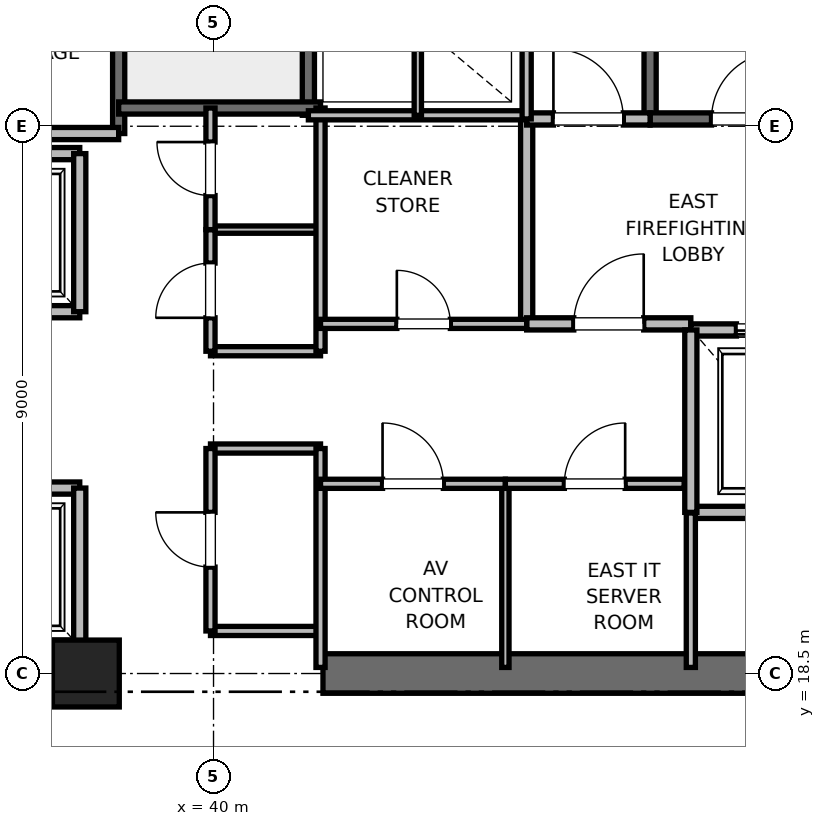
"""IFC4 building model, lengths in metres.
Left out: names, types, materials, properties, quantities, classifications, styles, units other than length and angle.
Written with IfcOpenShell. Run it as: python <this file> out.ifc"""

import sys

from ifc_helpers import new_model, si_unit, direction, frame, frame_2d, origin, origin_2d, place, context, subcontext, project, spatial, rectangle, extrude, element, fill, save


model = new_model("IFC4")
c1 = context("Model", 3, precision=1e-05, world=origin(), true_north=direction((0.0, 1.0)))
c2 = subcontext(c1, "Body", "Model", "MODEL_VIEW")
j1 = project(units=[si_unit("LENGTHUNIT", "METRE"), si_unit("PLANEANGLEUNIT", "RADIAN")], contexts=[c1])
p1 = place(None, origin())
s1 = spatial("IfcSite", under=j1, at=p1, CompositionType="ELEMENT")
p2 = place(p1, origin())
s2 = spatial("IfcBuilding", under=s1, at=p2, CompositionType="ELEMENT")
p3 = place(p2, frame((0.0, 0.0, 95.6)))
s3 = spatial("IfcBuildingStorey", under=s2, at=p3, CompositionType="ELEMENT", Elevation=95.6)
p4 = place(p3, frame((37.9, 18.5, 0.0), z_axis=(0.0, 0.0, 1.0), x_axis=(1.0, 0.0, 0.0)))
e1 = element("IfcColumn", 1, at=p4, inside=s3, PredefinedType="PILASTER", context=c2, shape_type="SweptSolid", body=[
    extrude(rectangle(XDim=1.1, YDim=1.1, at=origin_2d()), origin(), (0.0, 0.0, 1.0), 4.0),
])
for number, where, z_axis, x_axis in (
    (2, (29.0, 18.5, 0.0), (0.0, 0.0, 1.0), (1.0, 0.0, 0.0)),
    (3, (41.8, 18.5, 0.0), (0.0, 0.0, 1.0), (1.0, 0.0, 0.0)),
):
    element("IfcWall", number, at=place(p3, frame(where, z_axis=z_axis, x_axis=x_axis)), inside=s3, PredefinedType="SHEAR", context=c2, shape_type="SweptSolid", body=[
        extrude(rectangle(XDim=9.2, YDim=0.65, at=frame_2d((4.6, 0.0))), origin(), (0.0, 0.0, 1.0), 3.76),
    ])
p5 = place(p3, frame((47.18, 27.62, 0.0), z_axis=(0.0, 0.0, 1.0), x_axis=(0.0, 1.0, 0.0)))
e4 = element("IfcWall", 4, at=p5, inside=s3, PredefinedType="SOLIDWALL", context=c2, shape_type="SweptSolid", body=[
    extrude(rectangle(XDim=8.18, YDim=0.2, at=frame_2d((4.09, 0.0))), origin(), (0.0, 0.0, 1.0), 3.76),
])
p6 = place(p3, frame((47.18, 27.62, 0.0), z_axis=(0.0, 0.0, 1.0), x_axis=(1.0, 0.0, 0.0)))
e5 = element("IfcWall", 5, at=p6, inside=s3, PredefinedType="SOLIDWALL", context=c2, shape_type="SweptSolid", body=[
    extrude(rectangle(XDim=3.12, YDim=0.2, at=frame_2d((1.56, 0.0))), origin(), (0.0, 0.0, 1.0), 3.76),
])
p7 = place(p6, frame((1.01, 0.0, 0.0)))
e6 = element("IfcOpeningElement", 6, at=p7, cuts=e5, PredefinedType="OPENING", context=c2, shape_type="SweptSolid", body=[
    extrude(rectangle(XDim=1.1, YDim=2.15, at=frame_2d((0.55, 1.075))), frame((0.0, 0.1, 0.0), z_axis=(0.0, -1.0, 0.0), x_axis=(1.0, 0.0, 0.0)), (0.0, 0.0, 1.0), 0.2),
])
p8 = place(p3, frame((38.44, 27.38, 0.0), z_axis=(0.0, 0.0, 1.0), x_axis=(0.0, 1.0, 0.0)))
e7 = element("IfcWall", 7, at=p8, inside=s3, PredefinedType="SOLIDWALL", context=c2, shape_type="SweptSolid", body=[
    extrude(rectangle(XDim=8.87, YDim=0.2, at=frame_2d((4.435, 0.0))), origin(), (0.0, 0.0, 1.0), 3.76),
])
p9 = place(p3, frame((41.56, 27.68, 0.0), z_axis=(0.0, 0.0, 1.0), x_axis=(0.0, 1.0, 0.0)))
e8 = element("IfcWall", 8, at=p9, inside=s3, PredefinedType="SOLIDWALL", context=c2, shape_type="SweptSolid", body=[
    extrude(rectangle(XDim=8.57, YDim=0.2, at=frame_2d((4.285, 0.0))), origin(), (0.0, 0.0, 1.0), 3.76),
])
p10 = place(p3, frame((38.44, 27.8, 0.0), z_axis=(0.0, 0.0, 1.0), x_axis=(1.0, 0.0, 0.0)))
e9 = element("IfcWall", 9, at=p10, inside=s3, PredefinedType="SOLIDWALL", context=c2, shape_type="SweptSolid", body=[
    extrude(rectangle(XDim=3.32, YDim=0.2, at=frame_2d((1.66, 0.0))), origin(), (0.0, 0.0, 1.0), 3.76),
])
p11 = place(p3, frame((32.82, 27.38, 0.0), z_axis=(0.0, 0.0, 1.0), x_axis=(1.0, 0.0, 0.0)))
e10 = element("IfcWall", 10, at=p11, inside=s3, PredefinedType="PARTITIONING", context=c2, shape_type="SweptSolid", body=[
    extrude(rectangle(XDim=5.62, YDim=0.2, at=frame_2d((2.81, 0.0))), origin(), (0.0, 0.0, 1.0), 3.76),
])
p12 = place(p3, frame((45.15, 24.25, 0.0), z_axis=(0.0, 0.0, 1.0), x_axis=(0.0, 1.0, 0.0)))
e11 = element("IfcWall", 11, at=p12, inside=s3, PredefinedType="PARTITIONING", context=c2, shape_type="SweptSolid", body=[
    extrude(rectangle(XDim=3.37, YDim=0.2, at=frame_2d((1.685, 0.0))), origin(), (0.0, 0.0, 1.0), 3.76),
])
p13 = place(p3, frame((45.15, 24.25, 0.0), z_axis=(0.0, 0.0, 1.0), x_axis=(1.0, 0.0, 0.0)))
e12 = element("IfcWall", 12, at=p13, inside=s3, PredefinedType="PARTITIONING", context=c2, shape_type="SweptSolid", body=[
    extrude(rectangle(XDim=2.7, YDim=0.2, at=frame_2d((1.35, 0.0))), origin(), (0.0, 0.0, 1.0), 3.76),
])
p14 = place(p13, frame((0.775, 0.0, 0.0)))
e13 = element("IfcOpeningElement", 13, at=p14, cuts=e12, PredefinedType="OPENING", context=c2, shape_type="SweptSolid", body=[
    extrude(rectangle(XDim=1.15, YDim=2.2, at=frame_2d((0.575, 1.1))), frame((0.0, 0.1, 0.0), z_axis=(0.0, -1.0, 0.0), x_axis=(1.0, 0.0, 0.0)), (0.0, 0.0, 1.0), 0.2),
])
p15 = place(p3, frame((45.15, 27.62, 0.0), z_axis=(0.0, 0.0, 1.0), x_axis=(1.0, 0.0, 0.0)))
e14 = element("IfcWall", 14, at=p15, inside=s3, PredefinedType="PARTITIONING", context=c2, shape_type="SweptSolid", body=[
    extrude(rectangle(XDim=2.03, YDim=0.2, at=frame_2d((1.015, 0.0))), origin(), (0.0, 0.0, 1.0), 3.76),
])
p16 = place(p15, frame((0.44, 0.0, 0.0)))
e15 = element("IfcOpeningElement", 15, at=p16, cuts=e14, PredefinedType="OPENING", context=c2, shape_type="SweptSolid", body=[
    extrude(rectangle(XDim=1.15, YDim=2.2, at=frame_2d((0.575, 1.1))), frame((0.0, 0.1, 0.0), z_axis=(0.0, -1.0, 0.0), x_axis=(1.0, 0.0, 0.0)), (0.0, 0.0, 1.0), 0.2),
])
p17 = place(p3, frame((47.85, 21.15, 0.0), z_axis=(0.0, 0.0, 1.0), x_axis=(1.0, 0.0, 0.0)))
e16 = element("IfcWall", 16, at=p17, inside=s3, PredefinedType="SOLIDWALL", context=c2, shape_type="SweptSolid", body=[
    extrude(rectangle(XDim=2.6, YDim=0.2, at=frame_2d((1.3, 0.0))), origin(), (0.0, 0.0, 1.0), 3.76),
])
p18 = place(p3, frame((50.45, 24.15, 0.0), z_axis=(0.0, 0.0, 1.0), x_axis=(-1.0, 0.0, 0.0)))
e17 = element("IfcWall", 17, at=p18, inside=s3, PredefinedType="SOLIDWALL", context=c2, shape_type="SweptSolid", body=[
    extrude(rectangle(XDim=2.6, YDim=0.2, at=frame_2d((1.3, 0.0))), origin(), (0.0, 0.0, 1.0), 2.54),
])
p19 = place(p18, frame((0.75, 0.0, 0.0)))
e18 = element("IfcOpeningElement", 18, at=p19, cuts=e17, PredefinedType="OPENING", context=c2, shape_type="SweptSolid", body=[
    extrude(rectangle(XDim=1.1, YDim=2.2, at=frame_2d((0.55, 1.1))), frame((0.0, 0.1, 0.0), z_axis=(0.0, -1.0, 0.0), x_axis=(1.0, 0.0, 0.0)), (0.0, 0.0, 1.0), 0.2),
])
p20 = place(p3, frame((47.85, 24.15, 0.0), z_axis=(0.0, 0.0, 1.0), x_axis=(0.0, -1.0, 0.0)))
e19 = element("IfcWall", 19, at=p20, inside=s3, PredefinedType="SOLIDWALL", context=c2, shape_type="SweptSolid", body=[
    extrude(rectangle(XDim=3.0, YDim=0.2, at=frame_2d((1.5, 0.0))), origin(), (0.0, 0.0, 1.0), 3.76),
])
p21 = place(p3, frame((35.5, 18.95, 0.0), z_axis=(0.0, 0.0, 1.0), x_axis=(1.0, 0.0, 0.0)))
e20 = element("IfcWall", 20, at=p21, inside=s3, PredefinedType="SOLIDWALL", context=c2, shape_type="SweptSolid", body=[
    extrude(rectangle(XDim=2.3, YDim=0.2, at=frame_2d((1.15, 0.0))), origin(), (0.0, 0.0, 1.0), 2.54),
])
p22 = place(p3, frame((37.8, 21.55, 0.0), z_axis=(0.0, 0.0, 1.0), x_axis=(-1.0, 0.0, 0.0)))
e21 = element("IfcWall", 21, at=p22, inside=s3, PredefinedType="SOLIDWALL", context=c2, shape_type="SweptSolid", body=[
    extrude(rectangle(XDim=2.3, YDim=0.2, at=frame_2d((1.15, 0.0))), origin(), (0.0, 0.0, 1.0), 3.76),
])
p23 = place(p22, frame((0.6, 0.0, 0.0)))
e22 = element("IfcOpeningElement", 22, at=p23, cuts=e21, PredefinedType="OPENING", context=c2, shape_type="SweptSolid", body=[
    extrude(rectangle(XDim=1.1, YDim=2.2, at=frame_2d((0.55, 1.1))), frame((0.0, 0.1, 0.0), z_axis=(0.0, -1.0, 0.0), x_axis=(1.0, 0.0, 0.0)), (0.0, 0.0, 1.0), 0.2),
])
p24 = place(p3, frame((37.8, 18.95, 0.0), z_axis=(0.0, 0.0, 1.0), x_axis=(0.0, 1.0, 0.0)))
e23 = element("IfcWall", 23, at=p24, inside=s3, PredefinedType="SOLIDWALL", context=c2, shape_type="SweptSolid", body=[
    extrude(rectangle(XDim=2.6, YDim=0.2, at=frame_2d((1.3, 0.0))), origin(), (0.0, 0.0, 1.0), 2.54),
])
p25 = place(p3, frame((35.5, 24.45, 0.0), z_axis=(0.0, 0.0, 1.0), x_axis=(1.0, 0.0, 0.0)))
e24 = element("IfcWall", 24, at=p25, inside=s3, PredefinedType="SOLIDWALL", context=c2, shape_type="SweptSolid", body=[
    extrude(rectangle(XDim=2.3, YDim=0.2, at=frame_2d((1.15, 0.0))), origin(), (0.0, 0.0, 1.0), 3.76),
])
p26 = place(p25, frame((0.6, 0.0, 0.0)))
e25 = element("IfcOpeningElement", 25, at=p26, cuts=e24, PredefinedType="OPENING", context=c2, shape_type="SweptSolid", body=[
    extrude(rectangle(XDim=1.1, YDim=2.2, at=frame_2d((0.55, 1.1))), frame((0.0, 0.1, 0.0), z_axis=(0.0, -1.0, 0.0), x_axis=(1.0, 0.0, 0.0)), (0.0, 0.0, 1.0), 0.2),
])
p27 = place(p3, frame((37.8, 27.05, 0.0), z_axis=(0.0, 0.0, 1.0), x_axis=(-1.0, 0.0, 0.0)))
e26 = element("IfcWall", 26, at=p27, inside=s3, PredefinedType="SOLIDWALL", context=c2, shape_type="SweptSolid", body=[
    extrude(rectangle(XDim=2.3, YDim=0.2, at=frame_2d((1.15, 0.0))), origin(), (0.0, 0.0, 1.0), 3.76),
])
p28 = place(p3, frame((37.8, 24.45, 0.0), z_axis=(0.0, 0.0, 1.0), x_axis=(0.0, 1.0, 0.0)))
e27 = element("IfcWall", 27, at=p28, inside=s3, PredefinedType="SOLIDWALL", context=c2, shape_type="SweptSolid", body=[
    extrude(rectangle(XDim=2.6, YDim=0.2, at=frame_2d((1.3, 0.0))), origin(), (0.0, 0.0, 1.0), 3.76),
])
for number, where, z_axis, x_axis in (
    (28, (39.95, 19.2, 0.0), (0.0, 0.0, 1.0), (1.0, 0.0, 0.0)),
    (29, (39.95, 22.2, 0.0), (0.0, 0.0, 1.0), (1.0, 0.0, 0.0)),
    (30, (39.95, 23.8, 0.0), (0.0, 0.0, 1.0), (1.0, 0.0, 0.0)),
):
    element("IfcWall", number, at=place(p3, frame(where, z_axis=z_axis, x_axis=x_axis)), inside=s3, PredefinedType="PARTITIONING", context=c2, shape_type="SweptSolid", body=[
        extrude(rectangle(XDim=1.81, YDim=0.15, at=frame_2d((0.905, 0.0))), origin(), (0.0, 0.0, 1.0), 2.85),
    ])
p29 = place(p3, frame((39.95, 25.8, 0.0), z_axis=(0.0, 0.0, 1.0), x_axis=(1.0, 0.0, 0.0)))
e31 = element("IfcWall", 31, at=p29, inside=s3, PredefinedType="PARTITIONING", context=c2, shape_type="SweptSolid", body=[
    extrude(rectangle(XDim=1.81, YDim=0.12, at=frame_2d((0.905, 0.0))), origin(), (0.0, 0.0, 1.0), 2.85),
])
p30 = place(p3, frame((41.76, 18.6, 0.0), z_axis=(0.0, 0.0, 1.0), x_axis=(0.0, 1.0, 0.0)))
e32 = element("IfcWall", 32, at=p30, inside=s3, PredefinedType="PARTITIONING", context=c2, shape_type="SweptSolid", body=[
    extrude(rectangle(XDim=3.6, YDim=0.15, at=frame_2d((1.8, 0.0))), origin(), (0.0, 0.0, 1.0), 2.54),
])
p31 = place(p3, frame((41.76, 23.8, 0.0), z_axis=(0.0, 0.0, 1.0), x_axis=(0.0, 1.0, 0.0)))
e33 = element("IfcWall", 33, at=p31, inside=s3, PredefinedType="PARTITIONING", context=c2, shape_type="SweptSolid", body=[
    extrude(rectangle(XDim=4.0, YDim=0.15, at=frame_2d((2.0, 0.0))), origin(), (0.0, 0.0, 1.0), 2.85),
])
p32 = place(p3, frame((39.95, 19.2, 0.0), z_axis=(0.0, 0.0, 1.0), x_axis=(0.0, 1.0, 0.0)))
e34 = element("IfcWall", 34, at=p32, inside=s3, PredefinedType="PARTITIONING", context=c2, shape_type="SweptSolid", body=[
    extrude(rectangle(XDim=3.0, YDim=0.15, at=frame_2d((1.5, 0.0))), origin(), (0.0, 0.0, 1.0), 2.85),
])
p33 = place(p32, frame((1.05, 0.0, 0.0)))
e35 = element("IfcOpeningElement", 35, at=p33, cuts=e34, PredefinedType="OPENING", context=c2, shape_type="SweptSolid", body=[
    extrude(rectangle(XDim=0.9, YDim=2.1, at=frame_2d((0.45, 1.05))), frame((0.0, 0.075, 0.0), z_axis=(0.0, -1.0, 0.0), x_axis=(1.0, 0.0, 0.0)), (0.0, 0.0, 1.0), 0.15),
])
p34 = place(p3, frame((39.95, 23.8, 0.0), z_axis=(0.0, 0.0, 1.0), x_axis=(0.0, 1.0, 0.0)))
e36 = element("IfcWall", 36, at=p34, inside=s3, PredefinedType="PARTITIONING", context=c2, shape_type="SweptSolid", body=[
    extrude(rectangle(XDim=2.0, YDim=0.15, at=frame_2d((1.0, 0.0))), origin(), (0.0, 0.0, 1.0), 2.85),
])
p35 = place(p34, frame((0.55, 0.0, 0.0)))
e37 = element("IfcOpeningElement", 37, at=p35, cuts=e36, PredefinedType="OPENING", context=c2, shape_type="SweptSolid", body=[
    extrude(rectangle(XDim=0.9, YDim=2.1, at=frame_2d((0.45, 1.05))), frame((0.0, 0.075, 0.0), z_axis=(0.0, -1.0, 0.0), x_axis=(1.0, 0.0, 0.0)), (0.0, 0.0, 1.0), 0.15),
])
p36 = place(p3, frame((39.95, 25.8, 0.0), z_axis=(0.0, 0.0, 1.0), x_axis=(0.0, 1.0, 0.0)))
e38 = element("IfcWall", 38, at=p36, inside=s3, PredefinedType="PARTITIONING", context=c2, shape_type="SweptSolid", body=[
    extrude(rectangle(XDim=2.0, YDim=0.15, at=frame_2d((1.0, 0.0))), origin(), (0.0, 0.0, 1.0), 2.85),
])
p37 = place(p36, frame((0.56, 0.0, 0.0)))
e39 = element("IfcOpeningElement", 39, at=p37, cuts=e38, PredefinedType="OPENING", context=c2, shape_type="SweptSolid", body=[
    extrude(rectangle(XDim=0.88, YDim=2.1, at=frame_2d((0.44, 1.05))), frame((0.0, 0.075, 0.0), z_axis=(0.0, -1.0, 0.0), x_axis=(1.0, 0.0, 0.0)), (0.0, 0.0, 1.0), 0.15),
])
p38 = place(p3, frame((41.56, 27.68, 0.0), z_axis=(0.0, 0.0, 1.0), x_axis=(1.0, 0.0, 0.0)))
e40 = element("IfcWall", 40, at=p38, inside=s3, PredefinedType="PARTITIONING", context=c2, shape_type="SweptSolid", body=[
    extrude(rectangle(XDim=3.59, YDim=0.15, at=frame_2d((1.795, 0.0))), origin(), (0.0, 0.0, 1.0), 2.85),
])
p39 = place(p3, frame((47.85, 18.6, 0.0), z_axis=(0.0, 0.0, 1.0), x_axis=(0.0, 1.0, 0.0)))
e41 = element("IfcWall", 41, at=p39, inside=s3, PredefinedType="PARTITIONING", context=c2, shape_type="SweptSolid", body=[
    extrude(rectangle(XDim=2.54, YDim=0.15, at=frame_2d((1.27, 0.0))), origin(), (0.0, 0.0, 1.0), 2.85),
])
p40 = place(p3, frame((44.8, 18.6, 0.0), z_axis=(0.0, 0.0, 1.0), x_axis=(0.0, 1.0, 0.0)))
e42 = element("IfcWall", 42, at=p40, inside=s3, PredefinedType="PARTITIONING", context=c2, shape_type="SweptSolid", body=[
    extrude(rectangle(XDim=3.02, YDim=0.12, at=frame_2d((1.51, 0.0))), origin(), (0.0, 0.0, 1.0), 2.85),
])
p41 = place(p3, frame((41.76, 21.62, 0.0), z_axis=(0.0, 0.0, 1.0), x_axis=(1.0, 0.0, 0.0)))
e43 = element("IfcWall", 43, at=p41, inside=s3, PredefinedType="PARTITIONING", context=c2, shape_type="SweptSolid", body=[
    extrude(rectangle(XDim=3.04, YDim=0.15, at=frame_2d((1.52, 0.0))), origin(), (0.0, 0.0, 1.0), 2.85),
])
p42 = place(p41, frame((1.02, 0.0, 0.0)))
e44 = element("IfcOpeningElement", 44, at=p42, cuts=e43, PredefinedType="OPENING", context=c2, shape_type="SweptSolid", body=[
    extrude(rectangle(XDim=1.0, YDim=2.15, at=frame_2d((0.5, 1.075))), frame((0.0, 0.075, 0.0), z_axis=(0.0, -1.0, 0.0), x_axis=(1.0, 0.0, 0.0)), (0.0, 0.0, 1.0), 0.15),
])
p43 = place(p3, frame((44.8, 21.62, 0.0), z_axis=(0.0, 0.0, 1.0), x_axis=(1.0, 0.0, 0.0)))
e45 = element("IfcWall", 45, at=p43, inside=s3, PredefinedType="PARTITIONING", context=c2, shape_type="SweptSolid", body=[
    extrude(rectangle(XDim=2.94, YDim=0.15, at=frame_2d((1.47, 0.0))), origin(), (0.0, 0.0, 1.0), 2.85),
])
p44 = place(p43, frame((0.97, 0.0, 0.0)))
e46 = element("IfcOpeningElement", 46, at=p44, cuts=e45, PredefinedType="OPENING", context=c2, shape_type="SweptSolid", body=[
    extrude(rectangle(XDim=1.0, YDim=2.15, at=frame_2d((0.5, 1.075))), frame((0.0, 0.075, 0.0), z_axis=(0.0, -1.0, 0.0), x_axis=(1.0, 0.0, 0.0)), (0.0, 0.0, 1.0), 0.15),
])
p45 = place(p3, frame((41.76, 24.25, 0.0), z_axis=(0.0, 0.0, 1.0), x_axis=(1.0, 0.0, 0.0)))
e47 = element("IfcWall", 47, at=p45, inside=s3, PredefinedType="PARTITIONING", context=c2, shape_type="SweptSolid", body=[
    extrude(rectangle(XDim=3.39, YDim=0.15, at=frame_2d((1.695, 0.0))), origin(), (0.0, 0.0, 1.0), 2.85),
])
p46 = place(p45, frame((1.255, 0.0, 0.0)))
e48 = element("IfcOpeningElement", 48, at=p46, cuts=e47, PredefinedType="OPENING", context=c2, shape_type="SweptSolid", body=[
    extrude(rectangle(XDim=0.88, YDim=2.1, at=frame_2d((0.44, 1.05))), frame((0.0, 0.075, 0.0), z_axis=(0.0, -1.0, 0.0), x_axis=(1.0, 0.0, 0.0)), (0.0, 0.0, 1.0), 0.15),
])
p47 = place(p3, frame((45.15, 27.62, 0.0), z_axis=(0.0, 0.0, 1.0), x_axis=(0.0, 1.0, 0.0)))
e49 = element("IfcWall", 49, at=p47, inside=s3, PredefinedType="PARTITIONING", context=c2, shape_type="SweptSolid", body=[
    extrude(rectangle(XDim=3.1, YDim=0.15, at=frame_2d((1.55, 0.0))), origin(), (0.0, 0.0, 1.0), 2.85),
])
p48 = place(p3, frame((43.36, 27.68, 0.0), z_axis=(0.0, 0.0, 1.0), x_axis=(0.0, 1.0, 0.0)))
e50 = element("IfcWall", 50, at=p48, inside=s3, PredefinedType="PARTITIONING", context=c2, shape_type="SweptSolid", body=[
    extrude(rectangle(XDim=3.04, YDim=0.12, at=frame_2d((1.52, 0.0))), origin(), (0.0, 0.0, 1.0), 2.85),
])
p49 = place(p7, origin())
e51 = element("IfcDoor", 51, at=p49, inside=s3, OperationType="SINGLE_SWING_RIGHT", PredefinedType="DOOR", context=c2, shape_type="SweptSolid", body=[
    extrude(rectangle(XDim=1.1, YDim=2.15, at=frame_2d((0.55, 1.075))), frame((0.0, 0.025, 0.0), z_axis=(0.0, -1.0, 0.0), x_axis=(1.0, 0.0, 0.0)), (0.0, 0.0, 1.0), 0.05),
])
fill(e6, e51)
p50 = place(p14, origin())
e52 = element("IfcDoor", 52, at=p50, inside=s3, OperationType="SINGLE_SWING_RIGHT", PredefinedType="DOOR", context=c2, shape_type="SweptSolid", body=[
    extrude(rectangle(XDim=1.15, YDim=2.2, at=frame_2d((0.575, 1.1))), frame((0.0, 0.025, 0.0), z_axis=(0.0, -1.0, 0.0), x_axis=(1.0, 0.0, 0.0)), (0.0, 0.0, 1.0), 0.05),
])
fill(e13, e52)
p51 = place(p16, origin())
e53 = element("IfcDoor", 53, at=p51, inside=s3, OperationType="SINGLE_SWING_LEFT", PredefinedType="DOOR", context=c2, shape_type="SweptSolid", body=[
    extrude(rectangle(XDim=1.15, YDim=2.2, at=frame_2d((0.575, 1.1))), frame((0.0, 0.025, 0.0), z_axis=(0.0, -1.0, 0.0), x_axis=(1.0, 0.0, 0.0)), (0.0, 0.0, 1.0), 0.05),
])
fill(e15, e53)
p52 = place(p19, origin())
e54 = element("IfcDoor", 54, at=p52, inside=s3, OperationType="SLIDING_TO_RIGHT", PredefinedType="DOOR", context=c2, shape_type="SweptSolid", body=[
    extrude(rectangle(XDim=1.1, YDim=2.2, at=frame_2d((0.55, 1.1))), frame((0.0, 0.025, 0.0), z_axis=(0.0, -1.0, 0.0), x_axis=(1.0, 0.0, 0.0)), (0.0, 0.0, 1.0), 0.05),
])
fill(e18, e54)
p53 = place(p33, origin())
e55 = element("IfcDoor", 55, at=p53, inside=s3, OperationType="SINGLE_SWING_RIGHT", PredefinedType="DOOR", context=c2, shape_type="SweptSolid", body=[
    extrude(rectangle(XDim=0.9, YDim=2.1, at=frame_2d((0.45, 1.05))), frame((0.0, 0.025, 0.0), z_axis=(0.0, -1.0, 0.0), x_axis=(1.0, 0.0, 0.0)), (0.0, 0.0, 1.0), 0.05),
])
fill(e35, e55)
p54 = place(p35, origin())
e56 = element("IfcDoor", 56, at=p54, inside=s3, OperationType="SINGLE_SWING_LEFT", PredefinedType="DOOR", context=c2, shape_type="SweptSolid", body=[
    extrude(rectangle(XDim=0.9, YDim=2.1, at=frame_2d((0.45, 1.05))), frame((0.0, 0.025, 0.0), z_axis=(0.0, -1.0, 0.0), x_axis=(1.0, 0.0, 0.0)), (0.0, 0.0, 1.0), 0.05),
])
fill(e37, e56)
p55 = place(p37, origin())
e57 = element("IfcDoor", 57, at=p55, inside=s3, OperationType="SINGLE_SWING_RIGHT", PredefinedType="DOOR", context=c2, shape_type="SweptSolid", body=[
    extrude(rectangle(XDim=0.88, YDim=2.1, at=frame_2d((0.44, 1.05))), frame((0.0, 0.025, 0.0), z_axis=(0.0, -1.0, 0.0), x_axis=(1.0, 0.0, 0.0)), (0.0, 0.0, 1.0), 0.05),
])
fill(e39, e57)
p56 = place(p42, origin())
e58 = element("IfcDoor", 58, at=p56, inside=s3, OperationType="SINGLE_SWING_LEFT", PredefinedType="DOOR", context=c2, shape_type="SweptSolid", body=[
    extrude(rectangle(XDim=1.0, YDim=2.15, at=frame_2d((0.5, 1.075))), frame((0.0, 0.025, 0.0), z_axis=(0.0, -1.0, 0.0), x_axis=(1.0, 0.0, 0.0)), (0.0, 0.0, 1.0), 0.05),
])
fill(e44, e58)
p57 = place(p44, origin())
e59 = element("IfcDoor", 59, at=p57, inside=s3, OperationType="SINGLE_SWING_RIGHT", PredefinedType="DOOR", context=c2, shape_type="SweptSolid", body=[
    extrude(rectangle(XDim=1.0, YDim=2.15, at=frame_2d((0.5, 1.075))), frame((0.0, 0.025, 0.0), z_axis=(0.0, -1.0, 0.0), x_axis=(1.0, 0.0, 0.0)), (0.0, 0.0, 1.0), 0.05),
])
fill(e46, e59)
p58 = place(p46, origin())
e60 = element("IfcDoor", 60, at=p58, inside=s3, OperationType="SINGLE_SWING_LEFT", PredefinedType="DOOR", context=c2, shape_type="SweptSolid", body=[
    extrude(rectangle(XDim=0.88, YDim=2.1, at=frame_2d((0.44, 1.05))), frame((0.0, 0.025, 0.0), z_axis=(0.0, -1.0, 0.0), x_axis=(1.0, 0.0, 0.0)), (0.0, 0.0, 1.0), 0.05),
])
fill(e48, e60)
save(model, sys.argv[1])
